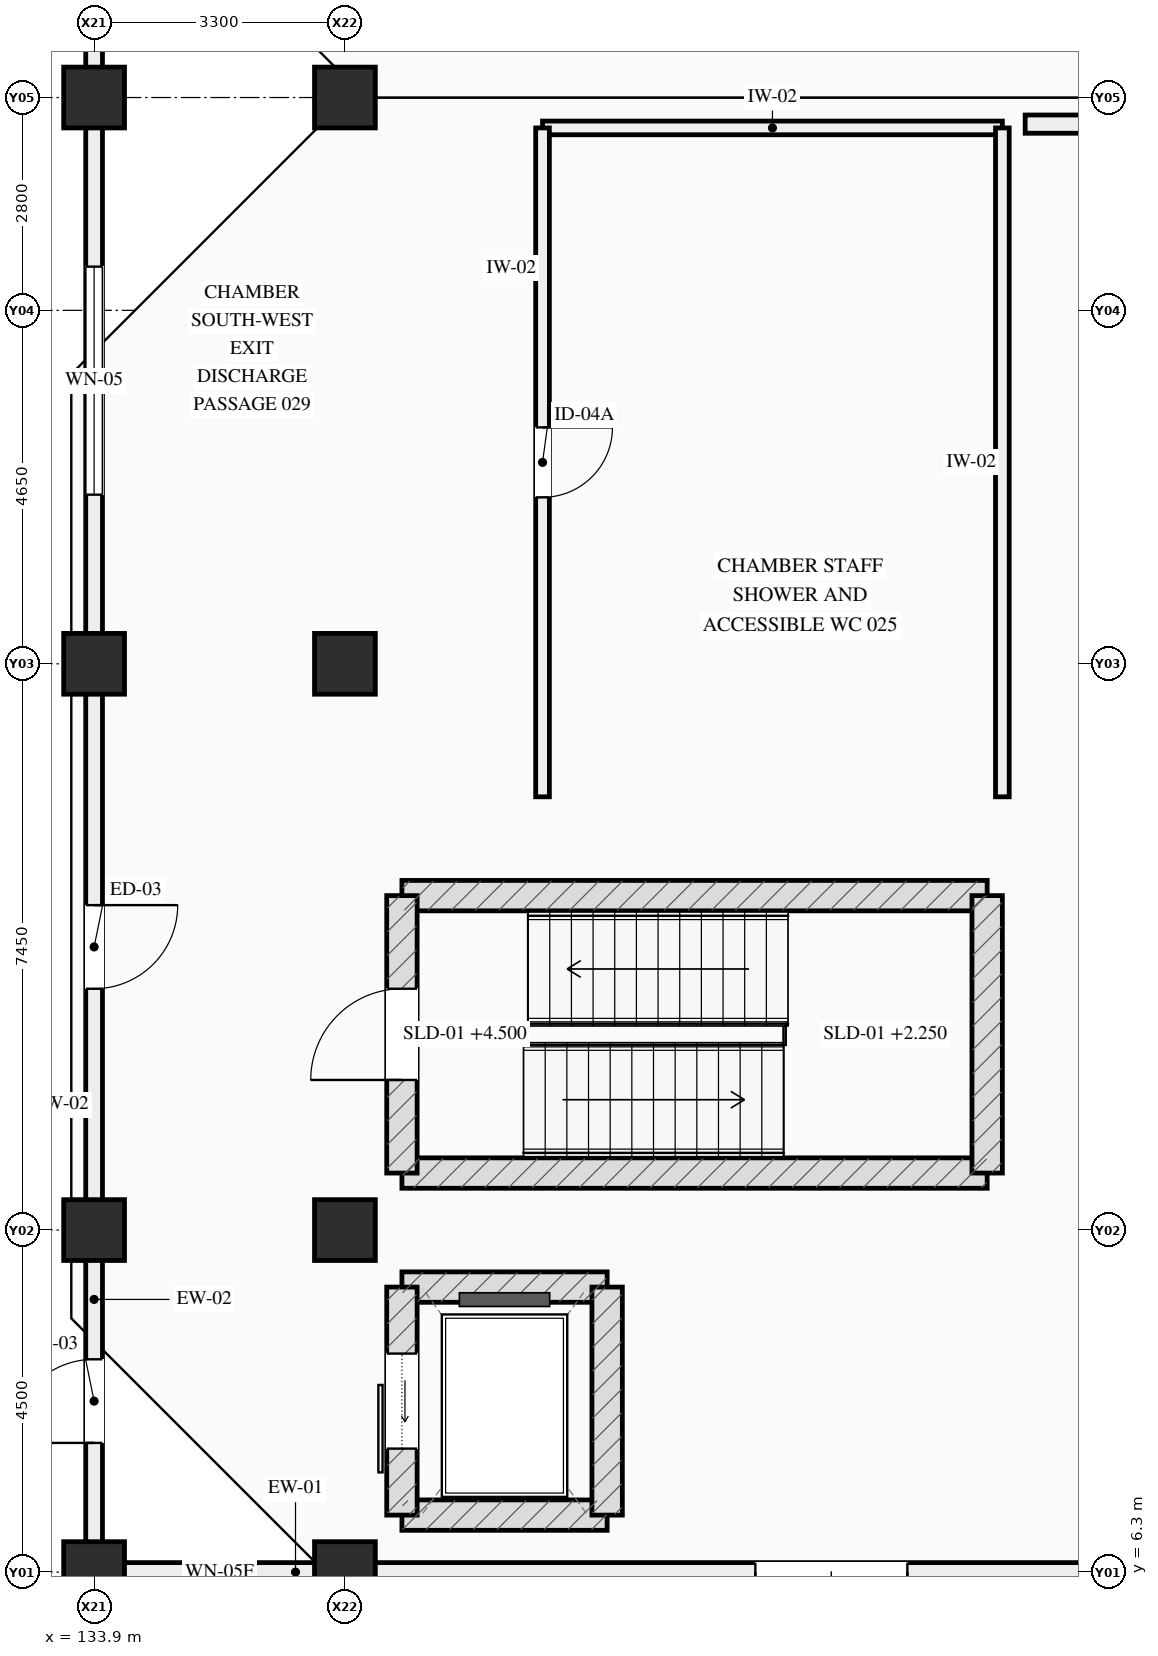
"""IFC4 building model, lengths in metres.
Left out: names, types, materials, properties, quantities, classifications, styles, units other than length and angle.
Written with IfcOpenShell. Run it as: python <this file> out.ifc"""

import sys

from ifc_helpers import new_model, si_unit, direction, frame, frame_2d, origin, origin_2d, place, context, subcontext, project, spatial, rectangle, extrude, element, fill, save


model = new_model("IFC4")
c1 = context("Model", 3, precision=1e-05, world=origin(), true_north=direction((0.0, 1.0)))
c2 = subcontext(c1, "Body", "Model", "MODEL_VIEW")
j1 = project(units=[si_unit("LENGTHUNIT", "METRE"), si_unit("PLANEANGLEUNIT", "RADIAN")], contexts=[c1])
p1 = place(None, origin())
s1 = spatial("IfcSite", under=j1, at=p1, CompositionType="ELEMENT")
p2 = place(p1, origin())
s2 = spatial("IfcBuilding", under=s1, at=p2, CompositionType="ELEMENT")
p3 = place(p2, origin())
s3 = spatial("IfcBuildingStorey", under=s2, at=p3, CompositionType="ELEMENT", Elevation=0.0)
for number, where, z_axis, x_axis in (
    (1, (133.9, 6.3, 0.0), (0.0, 0.0, 1.0), (1.0, 0.0, 0.0)),
    (2, (133.9, 10.8, 0.0), (0.0, 0.0, 1.0), (1.0, 0.0, 0.0)),
    (3, (133.9, 18.25, 0.0), (0.0, 0.0, 1.0), (1.0, 0.0, 0.0)),
    (4, (133.9, 25.7, 0.0), (0.0, 0.0, 1.0), (1.0, 0.0, 0.0)),
    (5, (137.2, 6.3, 0.0), (0.0, 0.0, 1.0), (1.0, 0.0, 0.0)),
    (6, (137.2, 10.8, 0.0), (0.0, 0.0, 1.0), (1.0, 0.0, 0.0)),
    (7, (137.2, 18.25, 0.0), (0.0, 0.0, 1.0), (1.0, 0.0, 0.0)),
    (8, (137.2, 25.7, 0.0), (0.0, 0.0, 1.0), (1.0, 0.0, 0.0)),
):
    element("IfcColumn", number, at=place(p3, frame(where, z_axis=z_axis, x_axis=x_axis)), inside=s3, PredefinedType="COLUMN", context=c2, shape_type="SweptSolid", body=[
        extrude(rectangle(XDim=0.8, YDim=0.8, at=origin_2d()), origin(), (0.0, 0.0, 1.0), 4.5),
    ])
p4 = place(p3, frame((136.825, 6.3, 0.0), z_axis=(0.0, 0.0, 1.0), x_axis=(-1.0, 0.0, 0.0)))
e9 = element("IfcWall", 9, at=p4, inside=s3, PredefinedType="STANDARD", context=c2, shape_type="SweptSolid", body=[
    extrude(rectangle(XDim=2.55, YDim=0.25, at=frame_2d((1.275, 0.0))), origin(), (0.0, 0.0, 1.0), 3.545),
])
p5 = place(p4, frame((0.8, 0.0, 1.08)))
e10 = element("IfcOpeningElement", 10, at=p5, cuts=e9, PredefinedType="OPENING", context=c2, shape_type="SweptSolid", body=[
    extrude(rectangle(XDim=0.95, YDim=1.05, at=frame_2d((0.475, 0.525))), frame((0.0, 0.135, 0.0), z_axis=(0.0, -1.0, 0.0), x_axis=(1.0, 0.0, 0.0)), (0.0, 0.0, 1.0), 0.27),
])
p6 = place(p3, frame((149.625, 6.3, 0.0), z_axis=(0.0, 0.0, 1.0), x_axis=(-1.0, 0.0, 0.0)))
e11 = element("IfcWall", 11, at=p6, inside=s3, PredefinedType="STANDARD", context=c2, shape_type="SweptSolid", body=[
    extrude(rectangle(XDim=12.05, YDim=0.25, at=frame_2d((6.025, 0.0))), origin(), (0.0, 0.0, 1.0), 3.545),
])
p7 = place(p6, frame((5.025, 0.0, 0.0)))
e12 = element("IfcOpeningElement", 12, at=p7, cuts=e11, PredefinedType="OPENING", context=c2, shape_type="SweptSolid", body=[
    extrude(rectangle(XDim=2.0, YDim=2.22, at=frame_2d((1.0, 1.11))), frame((0.0, 0.135, 0.0), z_axis=(0.0, -1.0, 0.0), x_axis=(1.0, 0.0, 0.0)), (0.0, 0.0, 1.0), 0.27),
])
p8 = place(p3, frame((133.9, 6.675, 0.0), z_axis=(0.0, 0.0, 1.0), x_axis=(0.0, 1.0, 0.0)))
e13 = element("IfcWall", 13, at=p8, inside=s3, PredefinedType="STANDARD", context=c2, shape_type="SweptSolid", body=[
    extrude(rectangle(XDim=3.75, YDim=0.22, at=frame_2d((1.875, 0.0))), origin(), (0.0, 0.0, 1.0), 3.545),
])
p9 = place(p8, frame((1.325, 0.0, 0.0)))
e14 = element("IfcOpeningElement", 14, at=p9, cuts=e13, PredefinedType="OPENING", context=c2, shape_type="SweptSolid", body=[
    extrude(rectangle(XDim=1.1, YDim=2.2, at=frame_2d((0.55, 1.1))), frame((0.0, 0.12, 0.0), z_axis=(0.0, -1.0, 0.0), x_axis=(1.0, 0.0, 0.0)), (0.0, 0.0, 1.0), 0.24),
])
p10 = place(p3, frame((133.9, 11.175, 0.0), z_axis=(0.0, 0.0, 1.0), x_axis=(0.0, 1.0, 0.0)))
e15 = element("IfcWall", 15, at=p10, inside=s3, PredefinedType="STANDARD", context=c2, shape_type="SweptSolid", body=[
    extrude(rectangle(XDim=6.7, YDim=0.22, at=frame_2d((3.35, 0.0))), origin(), (0.0, 0.0, 1.0), 3.545),
])
p11 = place(p10, frame((2.8, 0.0, 0.0)))
e16 = element("IfcOpeningElement", 16, at=p11, cuts=e15, PredefinedType="OPENING", context=c2, shape_type="SweptSolid", body=[
    extrude(rectangle(XDim=1.1, YDim=2.2, at=frame_2d((0.55, 1.1))), frame((0.0, 0.12, 0.0), z_axis=(0.0, -1.0, 0.0), x_axis=(1.0, 0.0, 0.0)), (0.0, 0.0, 1.0), 0.24),
])
p12 = place(p3, frame((133.9, 18.625, 0.0), z_axis=(0.0, 0.0, 1.0), x_axis=(0.0, 1.0, 0.0)))
e17 = element("IfcWall", 17, at=p12, inside=s3, PredefinedType="STANDARD", context=c2, shape_type="SweptSolid", body=[
    extrude(rectangle(XDim=6.7, YDim=0.22, at=frame_2d((3.35, 0.0))), origin(), (0.0, 0.0, 1.0), 3.545),
])
p13 = place(p12, frame((1.85, 0.0, 0.88)))
e18 = element("IfcOpeningElement", 18, at=p13, cuts=e17, PredefinedType="OPENING", context=c2, shape_type="SweptSolid", body=[
    extrude(rectangle(XDim=3.0, YDim=1.45, at=frame_2d((1.5, 0.725))), frame((0.0, 0.12, 0.0), z_axis=(0.0, -1.0, 0.0), x_axis=(1.0, 0.0, 0.0)), (0.0, 0.0, 1.0), 0.24),
])
p14 = place(p3, frame((133.9, 26.075, 0.0), z_axis=(0.0, 0.0, 1.0), x_axis=(0.0, 1.0, 0.0)))
e19 = element("IfcWall", 19, at=p14, inside=s3, PredefinedType="STANDARD", context=c2, shape_type="SweptSolid", body=[
    extrude(rectangle(XDim=3.35, YDim=0.22, at=frame_2d((1.675, 0.0))), origin(), (0.0, 0.0, 1.0), 3.545),
])
for number, where, z_axis, x_axis in (
    (20, (145.65, 11.55, 0.0), (0.0, 0.0, 1.0), (-1.0, 0.0, 0.0)),
    (21, (137.95, 15.2, 0.0), (0.0, 0.0, 1.0), (1.0, 0.0, 0.0)),
):
    element("IfcWall", number, at=place(p3, frame(where, z_axis=z_axis, x_axis=x_axis)), inside=s3, PredefinedType="SHEAR", context=c2, shape_type="SweptSolid", body=[
        extrude(rectangle(XDim=7.7, YDim=0.4, at=frame_2d((3.85, 0.0))), origin(), (0.0, 0.0, 1.0), 4.215),
    ])
p15 = place(p3, frame((137.95, 11.55, 0.0), z_axis=(0.0, 0.0, 1.0), x_axis=(0.0, 1.0, 0.0)))
e22 = element("IfcWall", 22, at=p15, inside=s3, PredefinedType="SHEAR", context=c2, shape_type="SweptSolid", body=[
    extrude(rectangle(XDim=3.65, YDim=0.4, at=frame_2d((1.825, 0.0))), origin(), (0.0, 0.0, 1.0), 4.215),
])
p16 = place(p15, frame((1.225, 0.0, 0.0)))
e23 = element("IfcOpeningElement", 23, at=p16, cuts=e22, PredefinedType="OPENING", context=c2, shape_type="SweptSolid", body=[
    extrude(rectangle(XDim=1.2, YDim=2.2, at=frame_2d((0.6, 1.1))), frame((0.0, 0.21, 0.0), z_axis=(0.0, -1.0, 0.0), x_axis=(1.0, 0.0, 0.0)), (0.0, 0.0, 1.0), 0.42),
])
p17 = place(p3, frame((145.65, 15.2, 0.0), z_axis=(0.0, 0.0, 1.0), x_axis=(0.0, -1.0, 0.0)))
e24 = element("IfcWall", 24, at=p17, inside=s3, PredefinedType="SHEAR", context=c2, shape_type="SweptSolid", body=[
    extrude(rectangle(XDim=3.65, YDim=0.4, at=frame_2d((1.825, 0.0))), origin(), (0.0, 0.0, 1.0), 4.215),
])
for number, where, z_axis, x_axis in (
    (25, (137.95, 7.05, 0.0), (0.0, 0.0, 1.0), (1.0, 0.0, 0.0)),
    (26, (137.95, 10.05, 0.0), (0.0, 0.0, 1.0), (1.0, 0.0, 0.0)),
):
    element("IfcWall", number, at=place(p3, frame(where, z_axis=z_axis, x_axis=x_axis)), inside=s3, PredefinedType="SHEAR", context=c2, shape_type="SweptSolid", body=[
        extrude(rectangle(XDim=2.7, YDim=0.4, at=frame_2d((1.35, 0.0))), origin(), (0.0, 0.0, 1.0), 4.215),
    ])
p18 = place(p3, frame((137.95, 7.05, 0.0), z_axis=(0.0, 0.0, 1.0), x_axis=(0.0, 1.0, 0.0)))
e27 = element("IfcWall", 27, at=p18, inside=s3, PredefinedType="SHEAR", context=c2, shape_type="SweptSolid", body=[
    extrude(rectangle(XDim=3.0, YDim=0.4, at=frame_2d((1.5, 0.0))), origin(), (0.0, 0.0, 1.0), 4.215),
])
p19 = place(p18, frame((0.875, 0.0, 0.0)))
e28 = element("IfcOpeningElement", 28, at=p19, cuts=e27, PredefinedType="OPENING", context=c2, shape_type="SweptSolid", body=[
    extrude(rectangle(XDim=1.25, YDim=2.2, at=frame_2d((0.625, 1.1))), frame((0.0, 0.21, 0.0), z_axis=(0.0, -1.0, 0.0), x_axis=(1.0, 0.0, 0.0)), (0.0, 0.0, 1.0), 0.42),
])
p20 = place(p3, frame((140.65, 7.05, 0.0), z_axis=(0.0, 0.0, 1.0), x_axis=(0.0, 1.0, 0.0)))
e29 = element("IfcWall", 29, at=p20, inside=s3, PredefinedType="SHEAR", context=c2, shape_type="SweptSolid", body=[
    extrude(rectangle(XDim=3.0, YDim=0.4, at=frame_2d((1.5, 0.0))), origin(), (0.0, 0.0, 1.0), 4.215),
])
p21 = place(p3, frame((146.15, 25.35, 0.0), z_axis=(0.0, 0.0, 1.0), x_axis=(1.0, 0.0, 0.0)))
e30 = element("IfcWall", 30, at=p21, inside=s3, PredefinedType="SOLIDWALL", context=c2, shape_type="SweptSolid", body=[
    extrude(rectangle(XDim=28.7, YDim=0.24, at=frame_2d((14.35, 0.0))), origin(), (0.0, 0.0, 1.0), 3.3),
])
p22 = place(p21, frame((16.575, 0.0, 0.0)))
e31 = element("IfcOpeningElement", 31, at=p22, cuts=e30, PredefinedType="OPENING", context=c2, shape_type="SweptSolid", body=[
    extrude(rectangle(XDim=1.15, YDim=2.2, at=frame_2d((0.575, 1.1))), frame((0.0, 0.13, 0.0), z_axis=(0.0, -1.0, 0.0), x_axis=(1.0, 0.0, 0.0)), (0.0, 0.0, 1.0), 0.26),
])
p23 = place(p3, frame((139.8, 25.3, 0.0), z_axis=(0.0, 0.0, 1.0), x_axis=(1.0, 0.0, 0.0)))
e32 = element("IfcWall", 32, at=p23, inside=s3, PredefinedType="PLUMBINGWALL", context=c2, shape_type="SweptSolid", body=[
    extrude(rectangle(XDim=6.05, YDim=0.18, at=frame_2d((3.025, 0.0))), origin(), (0.0, 0.0, 1.0), 3.3),
])
p24 = place(p3, frame((139.8, 16.5, 0.0), z_axis=(0.0, 0.0, 1.0), x_axis=(0.0, 1.0, 0.0)))
e33 = element("IfcWall", 33, at=p24, inside=s3, PredefinedType="PLUMBINGWALL", context=c2, shape_type="SweptSolid", body=[
    extrude(rectangle(XDim=8.8, YDim=0.18, at=frame_2d((4.4, 0.0))), origin(), (0.0, 0.0, 1.0), 3.3),
])
p25 = place(p24, frame((3.94, 0.0, 0.0)))
e34 = element("IfcOpeningElement", 34, at=p25, cuts=e33, PredefinedType="OPENING", context=c2, shape_type="SweptSolid", body=[
    extrude(rectangle(XDim=0.92, YDim=2.1, at=frame_2d((0.46, 1.05))), frame((0.0, 0.1, 0.0), z_axis=(0.0, -1.0, 0.0), x_axis=(1.0, 0.0, 0.0)), (0.0, 0.0, 1.0), 0.2),
])
p26 = place(p3, frame((145.85, 16.5, 0.0), z_axis=(0.0, 0.0, 1.0), x_axis=(0.0, 1.0, 0.0)))
e35 = element("IfcWall", 35, at=p26, inside=s3, PredefinedType="PLUMBINGWALL", context=c2, shape_type="SweptSolid", body=[
    extrude(rectangle(XDim=8.8, YDim=0.18, at=frame_2d((4.4, 0.0))), origin(), (0.0, 0.0, 1.0), 3.3),
])
p27 = place(p5, origin())
e36 = element("IfcWindow", 36, at=p27, inside=s3, PartitioningType="SINGLE_PANEL", PredefinedType="WINDOW", context=c2, shape_type="SweptSolid", body=[
    extrude(rectangle(XDim=0.95, YDim=1.05, at=frame_2d((0.475, 0.525))), frame((0.0, 0.03, 0.0), z_axis=(0.0, -1.0, 0.0), x_axis=(1.0, 0.0, 0.0)), (0.0, 0.0, 1.0), 0.06),
])
fill(e10, e36)
p28 = place(p7, origin())
e37 = element("IfcDoor", 37, at=p28, inside=s3, OperationType="DOUBLE_DOOR_SINGLE_SWING", PredefinedType="DOOR", context=c2, shape_type="SweptSolid", body=[
    extrude(rectangle(XDim=2.0, YDim=2.22, at=frame_2d((1.0, 1.11))), frame((0.0, 0.025, 0.0), z_axis=(0.0, -1.0, 0.0), x_axis=(1.0, 0.0, 0.0)), (0.0, 0.0, 1.0), 0.05),
])
fill(e12, e37)
p29 = place(p9, origin())
e38 = element("IfcDoor", 38, at=p29, inside=s3, OperationType="SINGLE_SWING_LEFT", PredefinedType="DOOR", context=c2, shape_type="SweptSolid", body=[
    extrude(rectangle(XDim=1.1, YDim=2.2, at=frame_2d((0.55, 1.1))), frame((0.0, 0.025, 0.0), z_axis=(0.0, -1.0, 0.0), x_axis=(1.0, 0.0, 0.0)), (0.0, 0.0, 1.0), 0.05),
])
fill(e14, e38)
p30 = place(p11, origin())
e39 = element("IfcDoor", 39, at=p30, inside=s3, OperationType="SINGLE_SWING_RIGHT", PredefinedType="DOOR", context=c2, shape_type="SweptSolid", body=[
    extrude(rectangle(XDim=1.1, YDim=2.2, at=frame_2d((0.55, 1.1))), frame((0.0, 0.025, 0.0), z_axis=(0.0, -1.0, 0.0), x_axis=(1.0, 0.0, 0.0)), (0.0, 0.0, 1.0), 0.05),
])
fill(e16, e39)
p31 = place(p13, origin())
e40 = element("IfcWindow", 40, at=p31, inside=s3, PartitioningType="SINGLE_PANEL", PredefinedType="WINDOW", context=c2, shape_type="SweptSolid", body=[
    extrude(rectangle(XDim=3.0, YDim=1.45, at=frame_2d((1.5, 0.725))), frame((0.0, 0.03, 0.0), z_axis=(0.0, -1.0, 0.0), x_axis=(1.0, 0.0, 0.0)), (0.0, 0.0, 1.0), 0.06),
])
fill(e18, e40)
p32 = place(p16, origin())
e41 = element("IfcDoor", 41, at=p32, inside=s3, OperationType="SINGLE_SWING_LEFT", PredefinedType="DOOR", context=c2, shape_type="SweptSolid", body=[
    extrude(rectangle(XDim=1.2, YDim=2.2, at=frame_2d((0.6, 1.1))), frame((0.0, 0.025, 0.0), z_axis=(0.0, -1.0, 0.0), x_axis=(1.0, 0.0, 0.0)), (0.0, 0.0, 1.0), 0.05),
])
fill(e23, e41)
p33 = place(p19, origin())
e42 = element("IfcDoor", 42, at=p33, inside=s3, OperationType="SLIDING_TO_LEFT", PredefinedType="DOOR", context=c2, shape_type="SweptSolid", body=[
    extrude(rectangle(XDim=1.25, YDim=2.2, at=frame_2d((0.625, 1.1))), frame((0.0, 0.025, 0.0), z_axis=(0.0, -1.0, 0.0), x_axis=(1.0, 0.0, 0.0)), (0.0, 0.0, 1.0), 0.05),
])
fill(e28, e42)
p34 = place(p25, origin())
e43 = element("IfcDoor", 43, at=p34, inside=s3, OperationType="SINGLE_SWING_RIGHT", PredefinedType="DOOR", context=c2, shape_type="SweptSolid", body=[
    extrude(rectangle(XDim=0.92, YDim=2.1, at=frame_2d((0.46, 1.05))), frame((0.0, 0.025, 0.0), z_axis=(0.0, -1.0, 0.0), x_axis=(1.0, 0.0, 0.0)), (0.0, 0.0, 1.0), 0.05),
])
fill(e34, e43)
save(model, sys.argv[1])
